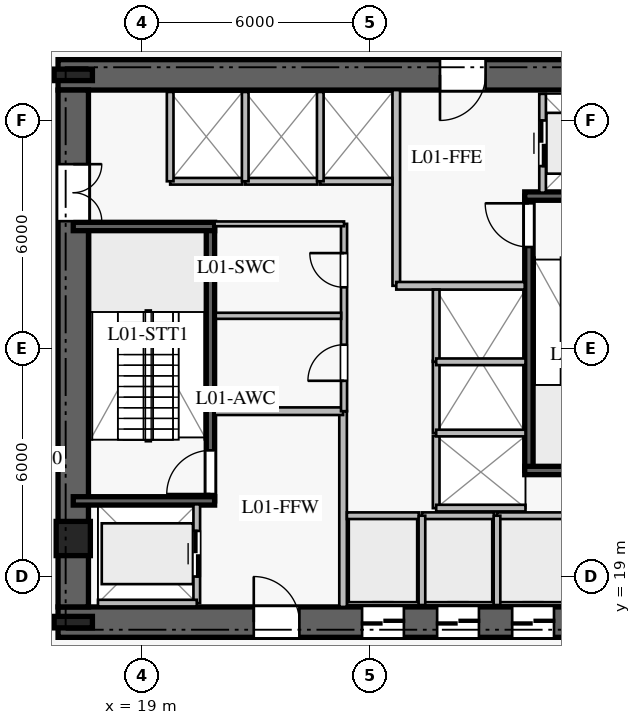
"""IFC4 building model, lengths in metres.
Left out: names, types, materials, properties, quantities, classifications, styles, units other than length and angle.
Written with IfcOpenShell. Run it as: python <this file> out.ifc"""

import sys

from ifc_helpers import new_model, si_unit, direction, frame, frame_2d, origin, origin_2d, place, context, subcontext, project, spatial, rectangle, i_section, extrude, element, fill, save


model = new_model("IFC4")
c1 = context("Model", 3, precision=1e-05, world=origin(), true_north=direction((0.0, 1.0)))
c2 = subcontext(c1, "Body", "Model", "MODEL_VIEW")
j1 = project(units=[si_unit("LENGTHUNIT", "METRE"), si_unit("PLANEANGLEUNIT", "RADIAN")], contexts=[c1])
p1 = place(None, origin())
s1 = spatial("IfcSite", under=j1, at=p1, CompositionType="ELEMENT")
p2 = place(p1, origin())
s2 = spatial("IfcBuilding", under=s1, at=p2, CompositionType="ELEMENT")
p3 = place(p2, frame((0.0, 0.0, 5.2)))
s3 = spatial("IfcBuildingStorey", under=s2, at=p3, CompositionType="ELEMENT", Elevation=5.2)
p4 = place(p3, frame((16.8, 17.8, 0.0), z_axis=(0.0, 0.0, 1.0), x_axis=(1.0, 0.0, 0.0)))
e1 = element("IfcWall", 1, at=p4, inside=s3, PredefinedType="SHEAR", context=c2, shape_type="SweptSolid", body=[
    extrude(rectangle(XDim=16.4, YDim=0.8, at=frame_2d((8.2, 0.0))), origin(), (0.0, 0.0, 1.0), 4.34),
])
p5 = place(p4, frame((5.15, 0.0, 0.0)))
e2 = element("IfcOpeningElement", 2, at=p5, cuts=e1, PredefinedType="OPENING", context=c2, shape_type="SweptSolid", body=[
    extrude(rectangle(XDim=1.2, YDim=2.25, at=frame_2d((0.6, 1.125))), frame((0.0, 0.41, 0.0), z_axis=(0.0, -1.0, 0.0), x_axis=(1.0, 0.0, 0.0)), (0.0, 0.0, 1.0), 0.82),
])
p6 = place(p4, frame((14.1, 0.0, 0.0)))
e3 = element("IfcOpeningElement", 3, at=p6, cuts=e1, PredefinedType="OPENING", context=c2, shape_type="SweptSolid", body=[
    extrude(rectangle(XDim=0.9, YDim=2.1, at=frame_2d((0.45, 1.05))), frame((0.0, 0.41, 0.0), z_axis=(0.0, -1.0, 0.0), x_axis=(1.0, 0.0, 0.0)), (0.0, 0.0, 1.0), 0.82),
])
p7 = place(p4, frame((8.0, 0.0, 0.0)))
e4 = element("IfcOpeningElement", 4, at=p7, cuts=e1, PredefinedType="OPENING", context=c2, shape_type="SweptSolid", body=[
    extrude(rectangle(XDim=1.1, YDim=2.2, at=frame_2d((0.55, 1.1))), frame((0.0, 0.41, 0.0), z_axis=(0.0, -1.0, 0.0), x_axis=(1.0, 0.0, 0.0)), (0.0, 0.0, 1.0), 0.82),
])
p8 = place(p4, frame((9.975, 0.0, 0.0)))
e5 = element("IfcOpeningElement", 5, at=p8, cuts=e1, PredefinedType="OPENING", context=c2, shape_type="SweptSolid", body=[
    extrude(rectangle(XDim=1.1, YDim=2.2, at=frame_2d((0.55, 1.1))), frame((0.0, 0.41, 0.0), z_axis=(0.0, -1.0, 0.0), x_axis=(1.0, 0.0, 0.0)), (0.0, 0.0, 1.0), 0.82),
])
p9 = place(p4, frame((11.95, 0.0, 0.0)))
e6 = element("IfcOpeningElement", 6, at=p9, cuts=e1, PredefinedType="OPENING", context=c2, shape_type="SweptSolid", body=[
    extrude(rectangle(XDim=1.1, YDim=2.2, at=frame_2d((0.55, 1.1))), frame((0.0, 0.41, 0.0), z_axis=(0.0, -1.0, 0.0), x_axis=(1.0, 0.0, 0.0)), (0.0, 0.0, 1.0), 0.82),
])
p10 = place(p3, frame((33.2, 32.2, 0.0), z_axis=(0.0, 0.0, 1.0), x_axis=(-1.0, 0.0, 0.0)))
e7 = element("IfcWall", 7, at=p10, inside=s3, PredefinedType="SHEAR", context=c2, shape_type="SweptSolid", body=[
    extrude(rectangle(XDim=16.4, YDim=0.8, at=frame_2d((8.2, 0.0))), origin(), (0.0, 0.0, 1.0), 4.34),
])
p11 = place(p10, frame((5.15, 0.0, 0.0)))
e8 = element("IfcOpeningElement", 8, at=p11, cuts=e7, PredefinedType="OPENING", context=c2, shape_type="SweptSolid", body=[
    extrude(rectangle(XDim=1.2, YDim=2.25, at=frame_2d((0.6, 1.125))), frame((0.0, 0.41, 0.0), z_axis=(0.0, -1.0, 0.0), x_axis=(1.0, 0.0, 0.0)), (0.0, 0.0, 1.0), 0.82),
])
p12 = place(p3, frame((17.2, 31.8, 0.0), z_axis=(0.0, 0.0, 1.0), x_axis=(0.0, -1.0, 0.0)))
e9 = element("IfcWall", 9, at=p12, inside=s3, PredefinedType="SHEAR", context=c2, shape_type="SweptSolid", body=[
    extrude(rectangle(XDim=13.6, YDim=0.8, at=frame_2d((6.8, 0.0))), origin(), (0.0, 0.0, 1.0), 4.34),
])
p13 = place(p12, frame((1.95, 0.0, 0.0)))
e10 = element("IfcOpeningElement", 10, at=p13, cuts=e9, PredefinedType="OPENING", context=c2, shape_type="SweptSolid", body=[
    extrude(rectangle(XDim=1.5, YDim=2.2, at=frame_2d((0.75, 1.1))), frame((0.0, 0.41, 0.0), z_axis=(0.0, -1.0, 0.0), x_axis=(1.0, 0.0, 0.0)), (0.0, 0.0, 1.0), 0.82),
])
for number, where, z_axis, x_axis in (
    (11, (17.2, 17.8, 0.0), (0.0, 0.0, 1.0), (1.0, 0.0, 0.0)),
    (12, (17.2, 32.2, 0.0), (0.0, 0.0, 1.0), (1.0, 0.0, 0.0)),
):
    element("IfcColumn", number, at=place(p3, frame(where, z_axis=z_axis, x_axis=x_axis)), inside=s3, PredefinedType="COLUMN", context=c2, shape_type="SweptSolid", body=[
        extrude(i_section(OverallWidth=0.302, OverallDepth=1.008, WebThickness=0.021, FlangeThickness=0.04, at=origin_2d()), origin(), (0.0, 0.0, 1.0), 4.6),
    ])
p14 = place(p3, frame((20.81, 20.99, 0.0), z_axis=(0.0, 0.0, 1.0), x_axis=(0.0, 1.0, 0.0)))
e13 = element("IfcWall", 13, at=p14, inside=s3, PredefinedType="SOLIDWALL", context=c2, shape_type="SweptSolid", body=[
    extrude(rectangle(XDim=7.22, YDim=0.22, at=frame_2d((3.61, 0.0))), origin(), (0.0, 0.0, 1.0), 4.34),
])
p15 = place(p14, frame((0.18, 0.0, 0.0)))
e14 = element("IfcOpeningElement", 14, at=p15, cuts=e13, PredefinedType="OPENING", context=c2, shape_type="SweptSolid", body=[
    extrude(rectangle(XDim=1.15, YDim=2.2, at=frame_2d((0.575, 1.1))), frame((0.0, 0.12, 0.0), z_axis=(0.0, -1.0, 0.0), x_axis=(1.0, 0.0, 0.0)), (0.0, 0.0, 1.0), 0.24),
])
for number, where, z_axis, x_axis in (
    (15, (17.2, 20.99, 0.0), (0.0, 0.0, 1.0), (1.0, 0.0, 0.0)),
    (16, (17.2, 28.21, 0.0), (0.0, 0.0, 1.0), (1.0, 0.0, 0.0)),
):
    element("IfcWall", number, at=place(p3, frame(where, z_axis=z_axis, x_axis=x_axis)), inside=s3, PredefinedType="SOLIDWALL", context=c2, shape_type="SweptSolid", body=[
        extrude(rectangle(XDim=3.72, YDim=0.22, at=frame_2d((1.86, 0.0))), origin(), (0.0, 0.0, 1.0), 4.34),
    ])
p16 = place(p3, frame((29.19, 21.79, 0.0), z_axis=(0.0, 0.0, 1.0), x_axis=(0.0, 1.0, 0.0)))
e17 = element("IfcWall", 17, at=p16, inside=s3, PredefinedType="SOLIDWALL", context=c2, shape_type="SweptSolid", body=[
    extrude(rectangle(XDim=7.22, YDim=0.22, at=frame_2d((3.61, 0.0))), origin(), (0.0, 0.0, 1.0), 4.34),
])
p17 = place(p16, frame((5.88, 0.0, 0.0)))
e18 = element("IfcOpeningElement", 18, at=p17, cuts=e17, PredefinedType="OPENING", context=c2, shape_type="SweptSolid", body=[
    extrude(rectangle(XDim=1.15, YDim=2.2, at=frame_2d((0.575, 1.1))), frame((0.0, 0.12, 0.0), z_axis=(0.0, -1.0, 0.0), x_axis=(1.0, 0.0, 0.0)), (0.0, 0.0, 1.0), 0.24),
])
for number, where, z_axis, x_axis in (
    (19, (29.08, 21.79, 0.0), (0.0, 0.0, 1.0), (1.0, 0.0, 0.0)),
    (20, (29.08, 29.01, 0.0), (0.0, 0.0, 1.0), (1.0, 0.0, 0.0)),
):
    element("IfcWall", number, at=place(p3, frame(where, z_axis=z_axis, x_axis=x_axis)), inside=s3, PredefinedType="SOLIDWALL", context=c2, shape_type="SweptSolid", body=[
        extrude(rectangle(XDim=3.72, YDim=0.22, at=frame_2d((1.86, 0.0))), origin(), (0.0, 0.0, 1.0), 4.34),
    ])
p18 = place(p3, frame((17.2, 20.0, 0.0), z_axis=(0.0, 0.0, 1.0), x_axis=(1.0, 0.0, 0.0)))
e21 = element("IfcColumn", 21, at=p18, inside=s3, PredefinedType="PILASTER", context=c2, shape_type="SweptSolid", body=[
    extrude(rectangle(XDim=0.9, YDim=0.9, at=origin_2d()), origin(), (0.0, 0.0, 1.0), 4.6),
])
p19 = place(p3, frame((24.3, 18.2, 0.0), z_axis=(0.0, 0.0, 1.0), x_axis=(0.0, 1.0, 0.0)))
e22 = element("IfcWall", 22, at=p19, inside=s3, PredefinedType="PARTITIONING", context=c2, shape_type="SweptSolid", body=[
    extrude(rectangle(XDim=5.15, YDim=0.2, at=frame_2d((2.575, 0.0))), origin(), (0.0, 0.0, 1.0), 4.34),
])
p20 = place(p3, frame((20.92, 23.35, 0.0), z_axis=(0.0, 0.0, 1.0), x_axis=(1.0, 0.0, 0.0)))
e23 = element("IfcWall", 23, at=p20, inside=s3, PredefinedType="PARTITIONING", context=c2, shape_type="SweptSolid", body=[
    extrude(rectangle(XDim=3.38, YDim=0.2, at=frame_2d((1.69, 0.0))), origin(), (0.0, 0.0, 1.0), 4.34),
])
p21 = place(p3, frame((25.7, 26.65, 0.0), z_axis=(0.0, 0.0, 1.0), x_axis=(0.0, 1.0, 0.0)))
e24 = element("IfcWall", 24, at=p21, inside=s3, PredefinedType="PARTITIONING", context=c2, shape_type="SweptSolid", body=[
    extrude(rectangle(XDim=5.15, YDim=0.2, at=frame_2d((2.575, 0.0))), origin(), (0.0, 0.0, 1.0), 4.34),
])
p22 = place(p3, frame((25.7, 26.65, 0.0), z_axis=(0.0, 0.0, 1.0), x_axis=(1.0, 0.0, 0.0)))
e25 = element("IfcWall", 25, at=p22, inside=s3, PredefinedType="PARTITIONING", context=c2, shape_type="SweptSolid", body=[
    extrude(rectangle(XDim=3.38, YDim=0.2, at=frame_2d((1.69, 0.0))), origin(), (0.0, 0.0, 1.0), 4.34),
])
p23 = place(p3, frame((24.325, 23.35, 0.0), z_axis=(0.0, 0.0, 1.0), x_axis=(0.0, 1.0, 0.0)))
e26 = element("IfcWall", 26, at=p23, inside=s3, PredefinedType="PLUMBINGWALL", context=c2, shape_type="SweptSolid", body=[
    extrude(rectangle(XDim=4.93, YDim=0.16, at=frame_2d((2.465, 0.0))), origin(), (0.0, 0.0, 1.0), 4.34),
])
p24 = place(p23, frame((0.8, 0.0, 0.0)))
e27 = element("IfcOpeningElement", 27, at=p24, cuts=e26, PredefinedType="OPENING", context=c2, shape_type="SweptSolid", body=[
    extrude(rectangle(XDim=0.95, YDim=2.1, at=frame_2d((0.475, 1.05))), frame((0.0, 0.09, 0.0), z_axis=(0.0, -1.0, 0.0), x_axis=(1.0, 0.0, 0.0)), (0.0, 0.0, 1.0), 0.18),
])
p25 = place(p23, frame((3.26, 0.0, 0.0)))
e28 = element("IfcOpeningElement", 28, at=p25, cuts=e26, PredefinedType="OPENING", context=c2, shape_type="SweptSolid", body=[
    extrude(rectangle(XDim=0.9, YDim=2.1, at=frame_2d((0.45, 1.05))), frame((0.0, 0.09, 0.0), z_axis=(0.0, -1.0, 0.0), x_axis=(1.0, 0.0, 0.0)), (0.0, 0.0, 1.0), 0.18),
])
p26 = place(p3, frame((20.92, 28.28, 0.0), z_axis=(0.0, 0.0, 1.0), x_axis=(1.0, 0.0, 0.0)))
e29 = element("IfcWall", 29, at=p26, inside=s3, PredefinedType="PARTITIONING", context=c2, shape_type="SweptSolid", body=[
    extrude(rectangle(XDim=3.405, YDim=0.125, at=frame_2d((1.703, 0.0))), origin(), (0.0, 0.0, 1.0), 4.34),
])
p27 = place(p3, frame((20.95, 25.86, 0.0), z_axis=(0.0, 0.0, 1.0), x_axis=(1.0, 0.0, 0.0)))
e30 = element("IfcWall", 30, at=p27, inside=s3, PredefinedType="PLUMBINGWALL", context=c2, shape_type="SweptSolid", body=[
    extrude(rectangle(XDim=3.3, YDim=0.16, at=frame_2d((1.65, 0.0))), origin(), (0.0, 0.0, 1.0), 4.34),
])
p28 = place(p3, frame((24.4, 20.6, 0.0), z_axis=(0.0, 0.0, 1.0), x_axis=(1.0, 0.0, 0.0)))
e31 = element("IfcWall", 31, at=p28, inside=s3, PredefinedType="PARTITIONING", context=c2, shape_type="SweptSolid", body=[
    extrude(rectangle(XDim=1.9, YDim=0.175, at=frame_2d((0.95, 0.0))), origin(), (0.0, 0.0, 1.0), 4.34),
])
p29 = place(p3, frame((26.375, 20.6, 0.0), z_axis=(0.0, 0.0, 1.0), x_axis=(1.0, 0.0, 0.0)))
e32 = element("IfcWall", 32, at=p29, inside=s3, PredefinedType="PARTITIONING", context=c2, shape_type="SweptSolid", body=[
    extrude(rectangle(XDim=1.9, YDim=0.175, at=frame_2d((0.95, 0.0))), origin(), (0.0, 0.0, 1.0), 4.34),
])
p30 = place(p3, frame((26.375, 18.25, 0.0), z_axis=(0.0, 0.0, 1.0), x_axis=(0.0, 1.0, 0.0)))
e33 = element("IfcWall", 33, at=p30, inside=s3, PredefinedType="PARTITIONING", context=c2, shape_type="SweptSolid", body=[
    extrude(rectangle(XDim=2.35, YDim=0.175, at=frame_2d((1.175, 0.0))), origin(), (0.0, 0.0, 1.0), 4.34),
])
p31 = place(p3, frame((28.35, 20.6, 0.0), z_axis=(0.0, 0.0, 1.0), x_axis=(1.0, 0.0, 0.0)))
e34 = element("IfcWall", 34, at=p31, inside=s3, PredefinedType="PARTITIONING", context=c2, shape_type="SweptSolid", body=[
    extrude(rectangle(XDim=1.9, YDim=0.175, at=frame_2d((0.95, 0.0))), origin(), (0.0, 0.0, 1.0), 4.34),
])
p32 = place(p3, frame((28.35, 18.25, 0.0), z_axis=(0.0, 0.0, 1.0), x_axis=(0.0, 1.0, 0.0)))
e35 = element("IfcWall", 35, at=p32, inside=s3, PredefinedType="PARTITIONING", context=c2, shape_type="SweptSolid", body=[
    extrude(rectangle(XDim=2.35, YDim=0.175, at=frame_2d((1.175, 0.0))), origin(), (0.0, 0.0, 1.0), 4.34),
])
p33 = place(p3, frame((19.75, 29.4, 0.0), z_axis=(0.0, 0.0, 1.0), x_axis=(1.0, 0.0, 0.0)))
e36 = element("IfcWall", 36, at=p33, inside=s3, PredefinedType="PARTITIONING", context=c2, shape_type="SweptSolid", body=[
    extrude(rectangle(XDim=1.9, YDim=0.175, at=frame_2d((0.95, 0.0))), origin(), (0.0, 0.0, 1.0), 4.34),
])
p34 = place(p3, frame((19.75, 29.4, 0.0), z_axis=(0.0, 0.0, 1.0), x_axis=(0.0, 1.0, 0.0)))
e37 = element("IfcWall", 37, at=p34, inside=s3, PredefinedType="PARTITIONING", context=c2, shape_type="SweptSolid", body=[
    extrude(rectangle(XDim=2.35, YDim=0.175, at=frame_2d((1.175, 0.0))), origin(), (0.0, 0.0, 1.0), 4.34),
])
p35 = place(p3, frame((21.725, 29.4, 0.0), z_axis=(0.0, 0.0, 1.0), x_axis=(1.0, 0.0, 0.0)))
e38 = element("IfcWall", 38, at=p35, inside=s3, PredefinedType="PARTITIONING", context=c2, shape_type="SweptSolid", body=[
    extrude(rectangle(XDim=1.9, YDim=0.175, at=frame_2d((0.95, 0.0))), origin(), (0.0, 0.0, 1.0), 4.34),
])
p36 = place(p3, frame((21.725, 29.4, 0.0), z_axis=(0.0, 0.0, 1.0), x_axis=(0.0, 1.0, 0.0)))
e39 = element("IfcWall", 39, at=p36, inside=s3, PredefinedType="PARTITIONING", context=c2, shape_type="SweptSolid", body=[
    extrude(rectangle(XDim=2.35, YDim=0.175, at=frame_2d((1.175, 0.0))), origin(), (0.0, 0.0, 1.0), 4.34),
])
p37 = place(p3, frame((23.7, 29.4, 0.0), z_axis=(0.0, 0.0, 1.0), x_axis=(1.0, 0.0, 0.0)))
e40 = element("IfcWall", 40, at=p37, inside=s3, PredefinedType="PARTITIONING", context=c2, shape_type="SweptSolid", body=[
    extrude(rectangle(XDim=1.9, YDim=0.175, at=frame_2d((0.95, 0.0))), origin(), (0.0, 0.0, 1.0), 4.34),
])
p38 = place(p3, frame((23.7, 29.4, 0.0), z_axis=(0.0, 0.0, 1.0), x_axis=(0.0, 1.0, 0.0)))
e41 = element("IfcWall", 41, at=p38, inside=s3, PredefinedType="PARTITIONING", context=c2, shape_type="SweptSolid", body=[
    extrude(rectangle(XDim=2.35, YDim=0.175, at=frame_2d((1.175, 0.0))), origin(), (0.0, 0.0, 1.0), 4.34),
])
p39 = place(p3, frame((26.75, 20.8, 0.0), z_axis=(0.0, 0.0, 1.0), x_axis=(0.0, 1.0, 0.0)))
e42 = element("IfcWall", 42, at=p39, inside=s3, PredefinedType="PARTITIONING", context=c2, shape_type="SweptSolid", body=[
    extrude(rectangle(XDim=1.9, YDim=0.175, at=frame_2d((0.95, 0.0))), origin(), (0.0, 0.0, 1.0), 4.34),
])
p40 = place(p3, frame((26.75, 20.8, 0.0), z_axis=(0.0, 0.0, 1.0), x_axis=(1.0, 0.0, 0.0)))
e43 = element("IfcWall", 43, at=p40, inside=s3, PredefinedType="PARTITIONING", context=c2, shape_type="SweptSolid", body=[
    extrude(rectangle(XDim=2.35, YDim=0.175, at=frame_2d((1.175, 0.0))), origin(), (0.0, 0.0, 1.0), 4.34),
])
p41 = place(p3, frame((26.75, 22.775, 0.0), z_axis=(0.0, 0.0, 1.0), x_axis=(0.0, 1.0, 0.0)))
e44 = element("IfcWall", 44, at=p41, inside=s3, PredefinedType="PARTITIONING", context=c2, shape_type="SweptSolid", body=[
    extrude(rectangle(XDim=1.9, YDim=0.175, at=frame_2d((0.95, 0.0))), origin(), (0.0, 0.0, 1.0), 4.34),
])
p42 = place(p3, frame((26.75, 22.775, 0.0), z_axis=(0.0, 0.0, 1.0), x_axis=(1.0, 0.0, 0.0)))
e45 = element("IfcWall", 45, at=p42, inside=s3, PredefinedType="PARTITIONING", context=c2, shape_type="SweptSolid", body=[
    extrude(rectangle(XDim=2.35, YDim=0.175, at=frame_2d((1.175, 0.0))), origin(), (0.0, 0.0, 1.0), 4.34),
])
p43 = place(p3, frame((26.75, 24.65, 0.0), z_axis=(0.0, 0.0, 1.0), x_axis=(0.0, 1.0, 0.0)))
e46 = element("IfcWall", 46, at=p43, inside=s3, PredefinedType="PARTITIONING", context=c2, shape_type="SweptSolid", body=[
    extrude(rectangle(XDim=1.9, YDim=0.175, at=frame_2d((0.95, 0.0))), origin(), (0.0, 0.0, 1.0), 4.34),
])
p44 = place(p3, frame((26.75, 24.65, 0.0), z_axis=(0.0, 0.0, 1.0), x_axis=(1.0, 0.0, 0.0)))
e47 = element("IfcWall", 47, at=p44, inside=s3, PredefinedType="PARTITIONING", context=c2, shape_type="SweptSolid", body=[
    extrude(rectangle(XDim=2.35, YDim=0.175, at=frame_2d((1.175, 0.0))), origin(), (0.0, 0.0, 1.0), 4.34),
])
p45 = place(p3, frame((20.45, 18.3, 0.0), z_axis=(0.0, 0.0, 1.0), x_axis=(0.0, 1.0, 0.0)))
e48 = element("IfcWall", 48, at=p45, inside=s3, PredefinedType="PARTITIONING", context=c2, shape_type="SweptSolid", body=[
    extrude(rectangle(XDim=2.6, YDim=0.175, at=frame_2d((1.3, 0.0))), origin(), (0.0, 0.0, 1.0), 4.34),
])
p46 = place(p45, frame((0.7, 0.0, 0.0)))
e49 = element("IfcOpeningElement", 49, at=p46, cuts=e48, PredefinedType="OPENING", context=c2, shape_type="SweptSolid", body=[
    extrude(rectangle(XDim=1.2, YDim=2.2, at=frame_2d((0.6, 1.1))), frame((0.0, 0.098, 0.0), z_axis=(0.0, -1.0, 0.0), x_axis=(1.0, 0.0, 0.0)), (0.0, 0.0, 1.0), 0.195),
])
p47 = place(p3, frame((17.85, 18.3, 0.0), z_axis=(0.0, 0.0, 1.0), x_axis=(1.0, 0.0, 0.0)))
e50 = element("IfcWall", 50, at=p47, inside=s3, PredefinedType="PARTITIONING", context=c2, shape_type="SweptSolid", body=[
    extrude(rectangle(XDim=2.6, YDim=0.175, at=frame_2d((1.3, 0.0))), origin(), (0.0, 0.0, 1.0), 4.34),
])
p48 = place(p3, frame((29.55, 29.1, 0.0), z_axis=(0.0, 0.0, 1.0), x_axis=(0.0, 1.0, 0.0)))
e51 = element("IfcWall", 51, at=p48, inside=s3, PredefinedType="PARTITIONING", context=c2, shape_type="SweptSolid", body=[
    extrude(rectangle(XDim=2.6, YDim=0.175, at=frame_2d((1.3, 0.0))), origin(), (0.0, 0.0, 1.0), 4.34),
])
p49 = place(p48, frame((0.7, 0.0, 0.0)))
e52 = element("IfcOpeningElement", 52, at=p49, cuts=e51, PredefinedType="OPENING", context=c2, shape_type="SweptSolid", body=[
    extrude(rectangle(XDim=1.2, YDim=2.2, at=frame_2d((0.6, 1.1))), frame((0.0, 0.098, 0.0), z_axis=(0.0, -1.0, 0.0), x_axis=(1.0, 0.0, 0.0)), (0.0, 0.0, 1.0), 0.195),
])
p50 = place(p15, origin())
e53 = element("IfcDoor", 53, at=p50, inside=s3, OperationType="SINGLE_SWING_LEFT", PredefinedType="DOOR", context=c2, shape_type="SweptSolid", body=[
    extrude(rectangle(XDim=1.15, YDim=2.2, at=frame_2d((0.575, 1.1))), frame((0.0, 0.025, 0.0), z_axis=(0.0, -1.0, 0.0), x_axis=(1.0, 0.0, 0.0)), (0.0, 0.0, 1.0), 0.05),
])
fill(e14, e53)
p51 = place(p17, origin())
e54 = element("IfcDoor", 54, at=p51, inside=s3, OperationType="SINGLE_SWING_RIGHT", PredefinedType="DOOR", context=c2, shape_type="SweptSolid", body=[
    extrude(rectangle(XDim=1.15, YDim=2.2, at=frame_2d((0.575, 1.1))), frame((0.0, 0.025, 0.0), z_axis=(0.0, -1.0, 0.0), x_axis=(1.0, 0.0, 0.0)), (0.0, 0.0, 1.0), 0.05),
])
fill(e18, e54)
p52 = place(p5, origin())
e55 = element("IfcDoor", 55, at=p52, inside=s3, OperationType="SINGLE_SWING_LEFT", PredefinedType="DOOR", context=c2, shape_type="SweptSolid", body=[
    extrude(rectangle(XDim=1.2, YDim=2.25, at=frame_2d((0.6, 1.125))), frame((0.0, 0.025, 0.0), z_axis=(0.0, -1.0, 0.0), x_axis=(1.0, 0.0, 0.0)), (0.0, 0.0, 1.0), 0.05),
])
fill(e2, e55)
p53 = place(p11, origin())
e56 = element("IfcDoor", 56, at=p53, inside=s3, OperationType="SINGLE_SWING_RIGHT", PredefinedType="DOOR", context=c2, shape_type="SweptSolid", body=[
    extrude(rectangle(XDim=1.2, YDim=2.25, at=frame_2d((0.6, 1.125))), frame((0.0, 0.025, 0.0), z_axis=(0.0, -1.0, 0.0), x_axis=(1.0, 0.0, 0.0)), (0.0, 0.0, 1.0), 0.05),
])
fill(e8, e56)
p54 = place(p13, origin())
e57 = element("IfcDoor", 57, at=p54, inside=s3, OperationType="DOUBLE_DOOR_SINGLE_SWING", PredefinedType="DOOR", context=c2, shape_type="SweptSolid", body=[
    extrude(rectangle(XDim=1.5, YDim=2.2, at=frame_2d((0.75, 1.1))), frame((0.0, 0.025, 0.0), z_axis=(0.0, -1.0, 0.0), x_axis=(1.0, 0.0, 0.0)), (0.0, 0.0, 1.0), 0.05),
])
fill(e10, e57)
p55 = place(p24, origin())
e58 = element("IfcDoor", 58, at=p55, inside=s3, OperationType="SINGLE_SWING_LEFT", PredefinedType="DOOR", context=c2, shape_type="SweptSolid", body=[
    extrude(rectangle(XDim=0.95, YDim=2.1, at=frame_2d((0.475, 1.05))), frame((0.0, 0.025, 0.0), z_axis=(0.0, -1.0, 0.0), x_axis=(1.0, 0.0, 0.0)), (0.0, 0.0, 1.0), 0.05),
])
fill(e27, e58)
p56 = place(p25, origin())
e59 = element("IfcDoor", 59, at=p56, inside=s3, OperationType="SINGLE_SWING_RIGHT", PredefinedType="DOOR", context=c2, shape_type="SweptSolid", body=[
    extrude(rectangle(XDim=0.9, YDim=2.1, at=frame_2d((0.45, 1.05))), frame((0.0, 0.025, 0.0), z_axis=(0.0, -1.0, 0.0), x_axis=(1.0, 0.0, 0.0)), (0.0, 0.0, 1.0), 0.05),
])
fill(e28, e59)
p57 = place(p7, origin())
e60 = element("IfcDoor", 60, at=p57, inside=s3, OperationType="DOUBLE_DOOR_SLIDING", PredefinedType="DOOR", context=c2, shape_type="SweptSolid", body=[
    extrude(rectangle(XDim=1.1, YDim=2.2, at=frame_2d((0.55, 1.1))), frame((0.0, 0.025, 0.0), z_axis=(0.0, -1.0, 0.0), x_axis=(1.0, 0.0, 0.0)), (0.0, 0.0, 1.0), 0.05),
])
fill(e4, e60)
p58 = place(p8, origin())
e61 = element("IfcDoor", 61, at=p58, inside=s3, OperationType="DOUBLE_DOOR_SLIDING", PredefinedType="DOOR", context=c2, shape_type="SweptSolid", body=[
    extrude(rectangle(XDim=1.1, YDim=2.2, at=frame_2d((0.55, 1.1))), frame((0.0, 0.025, 0.0), z_axis=(0.0, -1.0, 0.0), x_axis=(1.0, 0.0, 0.0)), (0.0, 0.0, 1.0), 0.05),
])
fill(e5, e61)
p59 = place(p9, origin())
e62 = element("IfcDoor", 62, at=p59, inside=s3, OperationType="DOUBLE_DOOR_SLIDING", PredefinedType="DOOR", context=c2, shape_type="SweptSolid", body=[
    extrude(rectangle(XDim=1.1, YDim=2.2, at=frame_2d((0.55, 1.1))), frame((0.0, 0.025, 0.0), z_axis=(0.0, -1.0, 0.0), x_axis=(1.0, 0.0, 0.0)), (0.0, 0.0, 1.0), 0.05),
])
fill(e6, e62)
p60 = place(p46, origin())
e63 = element("IfcDoor", 63, at=p60, inside=s3, OperationType="DOUBLE_DOOR_SLIDING", PredefinedType="DOOR", context=c2, shape_type="SweptSolid", body=[
    extrude(rectangle(XDim=1.2, YDim=2.2, at=frame_2d((0.6, 1.1))), frame((0.0, 0.025, 0.0), z_axis=(0.0, -1.0, 0.0), x_axis=(1.0, 0.0, 0.0)), (0.0, 0.0, 1.0), 0.05),
])
fill(e49, e63)
p61 = place(p49, origin())
e64 = element("IfcDoor", 64, at=p61, inside=s3, OperationType="DOUBLE_DOOR_SLIDING", PredefinedType="DOOR", context=c2, shape_type="SweptSolid", body=[
    extrude(rectangle(XDim=1.2, YDim=2.2, at=frame_2d((0.6, 1.1))), frame((0.0, 0.025, 0.0), z_axis=(0.0, -1.0, 0.0), x_axis=(1.0, 0.0, 0.0)), (0.0, 0.0, 1.0), 0.05),
])
fill(e52, e64)
save(model, sys.argv[1])
